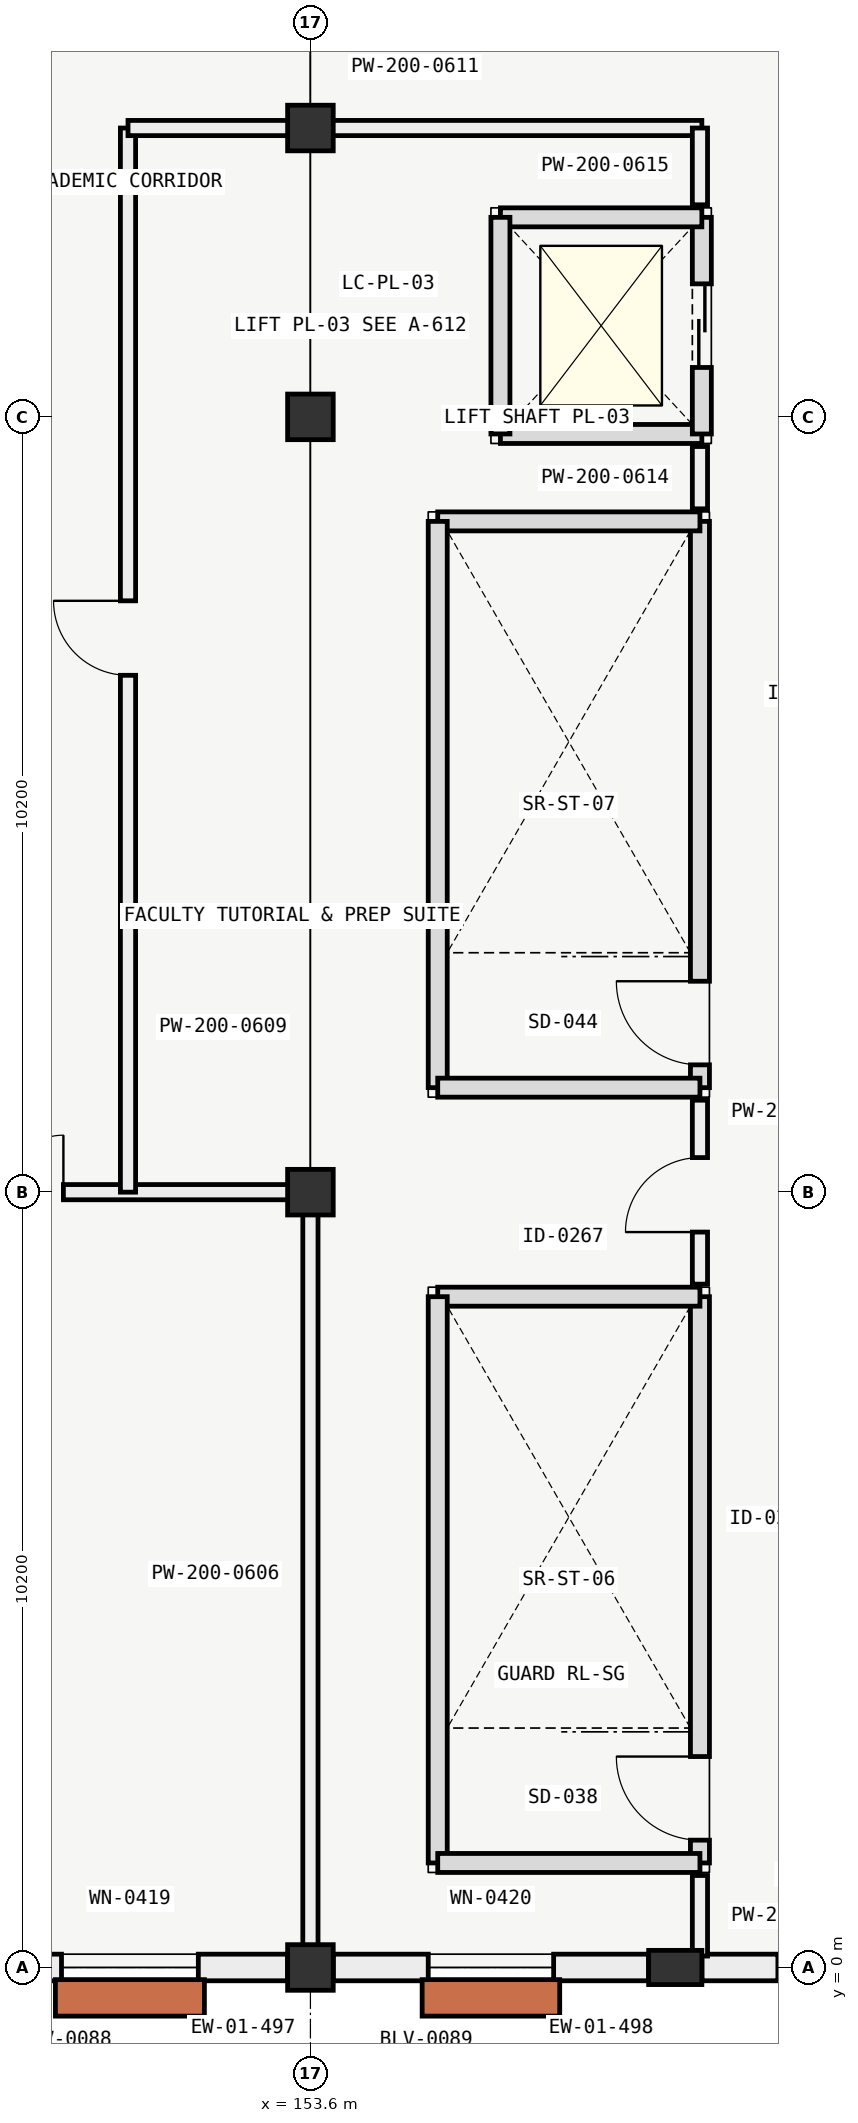
"""IFC4 building model, lengths in metres.
Left out: names, types, materials, properties, quantities, classifications, styles, units other than length and angle.
Written with IfcOpenShell. Run it as: python <this file> out.ifc"""

import sys

from ifc_helpers import new_model, si_unit, direction, frame, frame_2d, origin, origin_2d, place, context, subcontext, project, spatial, rectangle, extrude, element, fill, save


model = new_model("IFC4")
c1 = context("Model", 3, precision=1e-05, world=origin(), true_north=direction((0.0, 1.0)))
c2 = subcontext(c1, "Body", "Model", "MODEL_VIEW")
j1 = project(units=[si_unit("LENGTHUNIT", "METRE"), si_unit("PLANEANGLEUNIT", "RADIAN")], contexts=[c1])
p1 = place(None, origin())
s1 = spatial("IfcSite", under=j1, at=p1, CompositionType="ELEMENT")
p2 = place(p1, origin())
s2 = spatial("IfcBuilding", under=s1, at=p2, CompositionType="ELEMENT")
p3 = place(p2, frame((0.0, 0.0, 18.0)))
s3 = spatial("IfcBuildingStorey", under=s2, at=p3, CompositionType="ELEMENT", Elevation=18.0)
for number, where, z_axis, x_axis in (
    (1, (153.6, 0.0, 0.0), (0.0, 0.0, 1.0), (1.0, 0.0, 0.0)),
    (2, (153.6, 10.2, 0.0), (0.0, 0.0, 1.0), (1.0, 0.0, 0.0)),
    (3, (153.6, 20.4, 0.0), (0.0, 0.0, 1.0), (1.0, 0.0, 0.0)),
    (4, (153.6, 24.2, 0.0), (0.0, 0.0, 1.0), (1.0, 0.0, 0.0)),
):
    element("IfcColumn", number, at=place(p3, frame(where, z_axis=z_axis, x_axis=x_axis)), inside=s3, PredefinedType="COLUMN", context=c2, shape_type="SweptSolid", body=[
        extrude(rectangle(XDim=0.6, YDim=0.6, at=origin_2d()), origin(), (0.0, 0.0, 1.0), 4.2),
    ])
p4 = place(p3, frame((158.4, 0.0, 0.0), z_axis=(0.0, 0.0, 1.0), x_axis=(0.0, 1.0, 0.0)))
e5 = element("IfcColumn", 5, at=p4, inside=s3, PredefinedType="PILASTER", context=c2, shape_type="SweptSolid", body=[
    extrude(rectangle(XDim=0.45, YDim=0.7, at=origin_2d()), origin(), (0.0, 0.0, 1.0), 4.2),
])
p5 = place(p3, frame((153.299, 0.0, 0.0), z_axis=(0.0, 0.0, 1.0), x_axis=(-1.0, 0.0, 0.0)))
e6 = element("IfcWall", 6, at=p5, inside=s3, PredefinedType="SOLIDWALL", context=c2, shape_type="SweptSolid", body=[
    extrude(rectangle(XDim=4.148, YDim=0.35, at=frame_2d((2.074, 0.0))), origin(), (0.0, 0.0, 1.0), 3.3),
])
p6 = place(p5, frame((1.174, 0.0, 0.85)))
e7 = element("IfcOpeningElement", 7, at=p6, cuts=e6, PredefinedType="OPENING", context=c2, shape_type="SweptSolid", body=[
    extrude(rectangle(XDim=1.8, YDim=2.1, at=frame_2d((0.9, 1.05))), frame((0.0, 0.185, 0.0), z_axis=(0.0, -1.0, 0.0), x_axis=(1.0, 0.0, 0.0)), (0.0, 0.0, 1.0), 0.37),
])
p7 = place(p3, frame((158.049, 0.0, 0.0), z_axis=(0.0, 0.0, 1.0), x_axis=(-1.0, 0.0, 0.0)))
e8 = element("IfcWall", 8, at=p7, inside=s3, PredefinedType="SOLIDWALL", context=c2, shape_type="SweptSolid", body=[
    extrude(rectangle(XDim=4.148, YDim=0.35, at=frame_2d((2.074, 0.0))), origin(), (0.0, 0.0, 1.0), 3.3),
])
p8 = place(p7, frame((1.249, 0.0, 0.85)))
e9 = element("IfcOpeningElement", 9, at=p8, cuts=e8, PredefinedType="OPENING", context=c2, shape_type="SweptSolid", body=[
    extrude(rectangle(XDim=1.65, YDim=2.0, at=frame_2d((0.825, 1.0))), frame((0.0, 0.185, 0.0), z_axis=(0.0, -1.0, 0.0), x_axis=(1.0, 0.0, 0.0)), (0.0, 0.0, 1.0), 0.37),
])
p9 = place(p3, frame((161.95, 0.0, 0.0), z_axis=(0.0, 0.0, 1.0), x_axis=(-1.0, 0.0, 0.0)))
e10 = element("IfcWall", 10, at=p9, inside=s3, PredefinedType="SOLIDWALL", context=c2, shape_type="SweptSolid", body=[
    extrude(rectangle(XDim=3.199, YDim=0.35, at=frame_2d((1.6, 0.0))), origin(), (0.0, 0.0, 1.0), 3.3),
])
p10 = place(p9, frame((1.0, 0.0, 0.75)))
e11 = element("IfcOpeningElement", 11, at=p10, cuts=e10, PredefinedType="OPENING", context=c2, shape_type="SweptSolid", body=[
    extrude(rectangle(XDim=1.2, YDim=2.4, at=frame_2d((0.6, 1.2))), frame((0.0, 0.185, 0.0), z_axis=(0.0, -1.0, 0.0), x_axis=(1.0, 0.0, 0.0)), (0.0, 0.0, 1.0), 0.37),
])
p11 = place(p3, frame((158.725, 1.375, 0.0), z_axis=(0.0, 0.0, 1.0), x_axis=(0.0, 1.0, 0.0)))
e12 = element("IfcWall", 12, at=p11, inside=s3, PredefinedType="SOLIDWALL", context=c2, shape_type="SweptSolid", body=[
    extrude(rectangle(XDim=7.45, YDim=0.25, at=frame_2d((3.725, 0.0))), origin(), (0.0, 0.0, 1.0), 3.15),
])
p12 = place(p11, frame((0.3, 0.0, 0.0)))
e13 = element("IfcOpeningElement", 13, at=p12, cuts=e12, PredefinedType="OPENING", context=c2, shape_type="SweptSolid", body=[
    extrude(rectangle(XDim=1.1, YDim=2.2, at=frame_2d((0.55, 1.1))), frame((0.0, 0.135, 0.0), z_axis=(0.0, -1.0, 0.0), x_axis=(1.0, 0.0, 0.0)), (0.0, 0.0, 1.0), 0.27),
])
p13 = place(p3, frame((158.725, 8.825, 0.0), z_axis=(0.0, 0.0, 1.0), x_axis=(-1.0, 0.0, 0.0)))
e14 = element("IfcWall", 14, at=p13, inside=s3, PredefinedType="SOLIDWALL", context=c2, shape_type="SweptSolid", body=[
    extrude(rectangle(XDim=3.45, YDim=0.25, at=frame_2d((1.725, 0.0))), origin(), (0.0, 0.0, 1.0), 3.15),
])
p14 = place(p3, frame((155.275, 8.825, 0.0), z_axis=(0.0, 0.0, 1.0), x_axis=(0.0, -1.0, 0.0)))
e15 = element("IfcWall", 15, at=p14, inside=s3, PredefinedType="SOLIDWALL", context=c2, shape_type="SweptSolid", body=[
    extrude(rectangle(XDim=7.45, YDim=0.25, at=frame_2d((3.725, 0.0))), origin(), (0.0, 0.0, 1.0), 3.15),
])
p15 = place(p3, frame((155.275, 1.375, 0.0), z_axis=(0.0, 0.0, 1.0), x_axis=(1.0, 0.0, 0.0)))
e16 = element("IfcWall", 16, at=p15, inside=s3, PredefinedType="SOLIDWALL", context=c2, shape_type="SweptSolid", body=[
    extrude(rectangle(XDim=3.45, YDim=0.25, at=frame_2d((1.725, 0.0))), origin(), (0.0, 0.0, 1.0), 3.15),
])
p16 = place(p3, frame((158.725, 11.575, 0.0), z_axis=(0.0, 0.0, 1.0), x_axis=(0.0, 1.0, 0.0)))
e17 = element("IfcWall", 17, at=p16, inside=s3, PredefinedType="SOLIDWALL", context=c2, shape_type="SweptSolid", body=[
    extrude(rectangle(XDim=7.45, YDim=0.25, at=frame_2d((3.725, 0.0))), origin(), (0.0, 0.0, 1.0), 3.15),
])
p17 = place(p16, frame((0.3, 0.0, 0.0)))
e18 = element("IfcOpeningElement", 18, at=p17, cuts=e17, PredefinedType="OPENING", context=c2, shape_type="SweptSolid", body=[
    extrude(rectangle(XDim=1.1, YDim=2.2, at=frame_2d((0.55, 1.1))), frame((0.0, 0.135, 0.0), z_axis=(0.0, -1.0, 0.0), x_axis=(1.0, 0.0, 0.0)), (0.0, 0.0, 1.0), 0.27),
])
p18 = place(p3, frame((158.725, 19.025, 0.0), z_axis=(0.0, 0.0, 1.0), x_axis=(-1.0, 0.0, 0.0)))
e19 = element("IfcWall", 19, at=p18, inside=s3, PredefinedType="SOLIDWALL", context=c2, shape_type="SweptSolid", body=[
    extrude(rectangle(XDim=3.45, YDim=0.25, at=frame_2d((1.725, 0.0))), origin(), (0.0, 0.0, 1.0), 3.15),
])
p19 = place(p3, frame((155.275, 19.025, 0.0), z_axis=(0.0, 0.0, 1.0), x_axis=(0.0, -1.0, 0.0)))
e20 = element("IfcWall", 20, at=p19, inside=s3, PredefinedType="SOLIDWALL", context=c2, shape_type="SweptSolid", body=[
    extrude(rectangle(XDim=7.45, YDim=0.25, at=frame_2d((3.725, 0.0))), origin(), (0.0, 0.0, 1.0), 3.15),
])
p20 = place(p3, frame((155.275, 11.575, 0.0), z_axis=(0.0, 0.0, 1.0), x_axis=(1.0, 0.0, 0.0)))
e21 = element("IfcWall", 21, at=p20, inside=s3, PredefinedType="SOLIDWALL", context=c2, shape_type="SweptSolid", body=[
    extrude(rectangle(XDim=3.45, YDim=0.25, at=frame_2d((1.725, 0.0))), origin(), (0.0, 0.0, 1.0), 3.15),
])
p21 = place(p3, frame((156.1, 20.175, 0.0), z_axis=(0.0, 0.0, 1.0), x_axis=(1.0, 0.0, 0.0)))
e22 = element("IfcWall", 22, at=p21, inside=s3, PredefinedType="SOLIDWALL", context=c2, shape_type="SweptSolid", body=[
    extrude(rectangle(XDim=2.65, YDim=0.25, at=frame_2d((1.325, 0.0))), origin(), (0.0, 0.0, 1.0), 3.4),
])
p22 = place(p3, frame((158.75, 20.175, 0.0), z_axis=(0.0, 0.0, 1.0), x_axis=(0.0, 1.0, 0.0)))
e23 = element("IfcWall", 23, at=p22, inside=s3, PredefinedType="SOLIDWALL", context=c2, shape_type="SweptSolid", body=[
    extrude(rectangle(XDim=2.85, YDim=0.25, at=frame_2d((1.425, 0.0))), origin(), (0.0, 0.0, 1.0), 3.4),
])
p23 = place(p22, frame((0.875, 0.0, 0.0)))
e24 = element("IfcOpeningElement", 24, at=p23, cuts=e23, PredefinedType="OPENING", context=c2, shape_type="SweptSolid", body=[
    extrude(rectangle(XDim=1.1, YDim=2.1, at=frame_2d((0.55, 1.05))), frame((0.0, 0.135, 0.0), z_axis=(0.0, -1.0, 0.0), x_axis=(1.0, 0.0, 0.0)), (0.0, 0.0, 1.0), 0.27),
])
p24 = place(p3, frame((158.75, 23.025, 0.0), z_axis=(0.0, 0.0, 1.0), x_axis=(-1.0, 0.0, 0.0)))
e25 = element("IfcWall", 25, at=p24, inside=s3, PredefinedType="SOLIDWALL", context=c2, shape_type="SweptSolid", body=[
    extrude(rectangle(XDim=2.65, YDim=0.25, at=frame_2d((1.325, 0.0))), origin(), (0.0, 0.0, 1.0), 3.4),
])
p25 = place(p3, frame((156.1, 23.025, 0.0), z_axis=(0.0, 0.0, 1.0), x_axis=(0.0, -1.0, 0.0)))
e26 = element("IfcWall", 26, at=p25, inside=s3, PredefinedType="SOLIDWALL", context=c2, shape_type="SweptSolid", body=[
    extrude(rectangle(XDim=2.85, YDim=0.25, at=frame_2d((1.425, 0.0))), origin(), (0.0, 0.0, 1.0), 3.4),
])
p26 = place(p3, frame((134.55, 10.2, 0.0), z_axis=(0.0, 0.0, 1.0), x_axis=(1.0, 0.0, 0.0)))
e27 = element("IfcWall", 27, at=p26, inside=s3, PredefinedType="PARTITIONING", context=c2, shape_type="SweptSolid", body=[
    extrude(rectangle(XDim=19.05, YDim=0.2, at=frame_2d((9.525, 0.0))), origin(), (0.0, 0.0, 1.0), 3.85),
])
p27 = place(p26, frame((14.3, 0.0, 0.0)))
e28 = element("IfcOpeningElement", 28, at=p27, cuts=e27, PredefinedType="OPENING", context=c2, shape_type="SweptSolid", body=[
    extrude(rectangle(XDim=1.5, YDim=2.2, at=frame_2d((0.75, 1.1))), frame((0.0, 0.11, 0.0), z_axis=(0.0, -1.0, 0.0), x_axis=(1.0, 0.0, 0.0)), (0.0, 0.0, 1.0), 0.22),
])
p28 = place(p3, frame((153.6, 0.15, 0.0), z_axis=(0.0, 0.0, 1.0), x_axis=(0.0, 1.0, 0.0)))
e29 = element("IfcWall", 29, at=p28, inside=s3, PredefinedType="PARTITIONING", context=c2, shape_type="SweptSolid", body=[
    extrude(rectangle(XDim=10.05, YDim=0.2, at=frame_2d((5.025, 0.0))), origin(), (0.0, 0.0, 1.0), 3.85),
])
p29 = place(p3, frame((151.2, 10.2, 0.0), z_axis=(0.0, 0.0, 1.0), x_axis=(0.0, 1.0, 0.0)))
e30 = element("IfcWall", 30, at=p29, inside=s3, PredefinedType="PARTITIONING", context=c2, shape_type="SweptSolid", body=[
    extrude(rectangle(XDim=14.0, YDim=0.2, at=frame_2d((7.0, 0.0))), origin(), (0.0, 0.0, 1.0), 3.641),
])
p30 = place(p29, frame((6.8, 0.0, 0.0)))
e31 = element("IfcOpeningElement", 31, at=p30, cuts=e30, PredefinedType="OPENING", context=c2, shape_type="SweptSolid", body=[
    extrude(rectangle(XDim=0.98, YDim=2.15, at=frame_2d((0.49, 1.075))), frame((0.0, 0.11, 0.0), z_axis=(0.0, -1.0, 0.0), x_axis=(1.0, 0.0, 0.0)), (0.0, 0.0, 1.0), 0.22),
])
p31 = place(p3, frame((151.2, 24.2, 0.0), z_axis=(0.0, 0.0, 1.0), x_axis=(1.0, 0.0, 0.0)))
e32 = element("IfcWall", 32, at=p31, inside=s3, PredefinedType="PARTITIONING", context=c2, shape_type="SweptSolid", body=[
    extrude(rectangle(XDim=7.55, YDim=0.2, at=frame_2d((3.775, 0.0))), origin(), (0.0, 0.0, 1.0), 3.641),
])
p32 = place(p3, frame((158.725, 0.15, 0.0), z_axis=(0.0, 0.0, 1.0), x_axis=(0.0, 1.0, 0.0)))
e33 = element("IfcWall", 33, at=p32, inside=s3, PredefinedType="PARTITIONING", context=c2, shape_type="SweptSolid", body=[
    extrude(rectangle(XDim=1.06, YDim=0.2, at=frame_2d((0.53, 0.0))), origin(), (0.0, 0.0, 1.0), 3.85),
])
p33 = place(p3, frame((158.725, 8.99, 0.0), z_axis=(0.0, 0.0, 1.0), x_axis=(0.0, 1.0, 0.0)))
e34 = element("IfcWall", 34, at=p33, inside=s3, PredefinedType="PARTITIONING", context=c2, shape_type="SweptSolid", body=[
    extrude(rectangle(XDim=2.42, YDim=0.2, at=frame_2d((1.21, 0.0))), origin(), (0.0, 0.0, 1.0), 3.85),
])
p34 = place(p33, frame((0.685, 0.0, 0.0)))
e35 = element("IfcOpeningElement", 35, at=p34, cuts=e34, PredefinedType="OPENING", context=c2, shape_type="SweptSolid", body=[
    extrude(rectangle(XDim=0.98, YDim=2.15, at=frame_2d((0.49, 1.075))), frame((0.0, 0.11, 0.0), z_axis=(0.0, -1.0, 0.0), x_axis=(1.0, 0.0, 0.0)), (0.0, 0.0, 1.0), 0.22),
])
p35 = place(p3, frame((158.725, 19.19, 0.0), z_axis=(0.0, 0.0, 1.0), x_axis=(0.0, 1.0, 0.0)))
e36 = element("IfcWall", 36, at=p35, inside=s3, PredefinedType="PARTITIONING", context=c2, shape_type="SweptSolid", body=[
    extrude(rectangle(XDim=0.82, YDim=0.2, at=frame_2d((0.41, 0.0))), origin(), (0.0, 0.0, 1.0), 3.85),
])
p36 = place(p3, frame((158.725, 23.19, 0.0), z_axis=(0.0, 0.0, 1.0), x_axis=(0.0, 1.0, 0.0)))
e37 = element("IfcWall", 37, at=p36, inside=s3, PredefinedType="PARTITIONING", context=c2, shape_type="SweptSolid", body=[
    extrude(rectangle(XDim=1.01, YDim=0.2, at=frame_2d((0.505, 0.0))), origin(), (0.0, 0.0, 1.0), 3.641),
])
p37 = place(p6, origin())
e38 = element("IfcWindow", 38, at=p37, inside=s3, PartitioningType="SINGLE_PANEL", PredefinedType="WINDOW", context=c2, shape_type="SweptSolid", body=[
    extrude(rectangle(XDim=1.8, YDim=2.1, at=frame_2d((0.9, 1.05))), frame((0.0, 0.03, 0.0), z_axis=(0.0, -1.0, 0.0), x_axis=(1.0, 0.0, 0.0)), (0.0, 0.0, 1.0), 0.06),
])
fill(e7, e38)
p38 = place(p8, origin())
e39 = element("IfcWindow", 39, at=p38, inside=s3, PartitioningType="SINGLE_PANEL", PredefinedType="WINDOW", context=c2, shape_type="SweptSolid", body=[
    extrude(rectangle(XDim=1.65, YDim=2.0, at=frame_2d((0.825, 1.0))), frame((0.0, 0.03, 0.0), z_axis=(0.0, -1.0, 0.0), x_axis=(1.0, 0.0, 0.0)), (0.0, 0.0, 1.0), 0.06),
])
fill(e9, e39)
p39 = place(p12, origin())
e40 = element("IfcDoor", 40, at=p39, inside=s3, OperationType="SINGLE_SWING_RIGHT", PredefinedType="DOOR", context=c2, shape_type="SweptSolid", body=[
    extrude(rectangle(XDim=1.1, YDim=2.2, at=frame_2d((0.55, 1.1))), frame((0.0, 0.025, 0.0), z_axis=(0.0, -1.0, 0.0), x_axis=(1.0, 0.0, 0.0)), (0.0, 0.0, 1.0), 0.05),
])
fill(e13, e40)
p40 = place(p17, origin())
e41 = element("IfcDoor", 41, at=p40, inside=s3, OperationType="SINGLE_SWING_RIGHT", PredefinedType="DOOR", context=c2, shape_type="SweptSolid", body=[
    extrude(rectangle(XDim=1.1, YDim=2.2, at=frame_2d((0.55, 1.1))), frame((0.0, 0.025, 0.0), z_axis=(0.0, -1.0, 0.0), x_axis=(1.0, 0.0, 0.0)), (0.0, 0.0, 1.0), 0.05),
])
fill(e18, e41)
p41 = place(p23, origin())
e42 = element("IfcDoor", 42, at=p41, inside=s3, OperationType="SLIDING_TO_LEFT", PredefinedType="DOOR", context=c2, shape_type="SweptSolid", body=[
    extrude(rectangle(XDim=1.1, YDim=2.1, at=frame_2d((0.55, 1.05))), frame((0.0, 0.025, 0.0), z_axis=(0.0, -1.0, 0.0), x_axis=(1.0, 0.0, 0.0)), (0.0, 0.0, 1.0), 0.05),
])
fill(e24, e42)
p42 = place(p27, origin())
e43 = element("IfcDoor", 43, at=p42, inside=s3, OperationType="DOUBLE_DOOR_SINGLE_SWING", PredefinedType="DOOR", context=c2, shape_type="SweptSolid", body=[
    extrude(rectangle(XDim=1.5, YDim=2.2, at=frame_2d((0.75, 1.1))), frame((0.0, 0.025, 0.0), z_axis=(0.0, -1.0, 0.0), x_axis=(1.0, 0.0, 0.0)), (0.0, 0.0, 1.0), 0.05),
])
fill(e28, e43)
p43 = place(p30, origin())
e44 = element("IfcDoor", 44, at=p43, inside=s3, OperationType="SINGLE_SWING_RIGHT", PredefinedType="DOOR", context=c2, shape_type="SweptSolid", body=[
    extrude(rectangle(XDim=0.98, YDim=2.15, at=frame_2d((0.49, 1.075))), frame((0.0, 0.025, 0.0), z_axis=(0.0, -1.0, 0.0), x_axis=(1.0, 0.0, 0.0)), (0.0, 0.0, 1.0), 0.05),
])
fill(e31, e44)
p44 = place(p34, origin())
e45 = element("IfcDoor", 45, at=p44, inside=s3, OperationType="SINGLE_SWING_LEFT", PredefinedType="DOOR", context=c2, shape_type="SweptSolid", body=[
    extrude(rectangle(XDim=0.98, YDim=2.15, at=frame_2d((0.49, 1.075))), frame((0.0, 0.025, 0.0), z_axis=(0.0, -1.0, 0.0), x_axis=(1.0, 0.0, 0.0)), (0.0, 0.0, 1.0), 0.05),
])
fill(e35, e45)
save(model, sys.argv[1])
